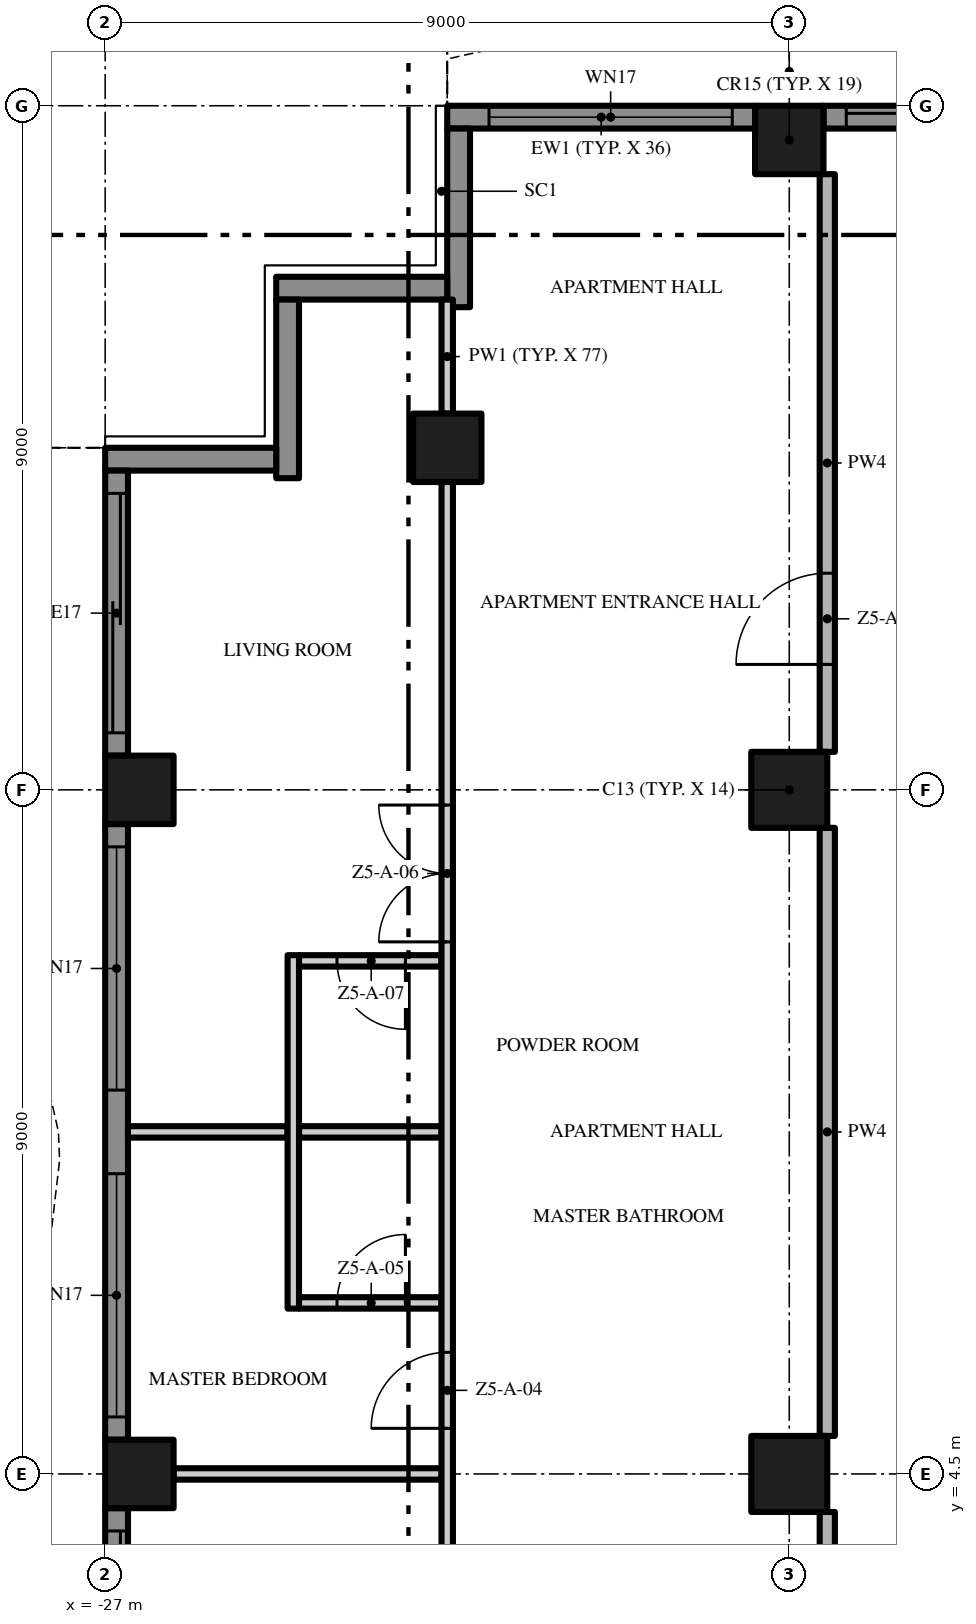
"""IFC4 building model, lengths in metres.
Left out: names, types, materials, properties, quantities, classifications, styles, units other than length and angle.
Written with IfcOpenShell. Run it as: python <this file> out.ifc"""

import sys

from ifc_helpers import new_model, si_unit, direction, frame, frame_2d, origin, origin_2d, place, context, subcontext, project, spatial, polyline, rectangle, outline, extrude, element, fill, save


model = new_model("IFC4")
c1 = context("Model", 3, precision=1e-05, world=origin(), true_north=direction((0.0, 1.0)))
c2 = subcontext(c1, "Body", "Model", "MODEL_VIEW")
j1 = project(units=[si_unit("LENGTHUNIT", "METRE"), si_unit("PLANEANGLEUNIT", "RADIAN")], contexts=[c1])
p1 = place(None, origin())
s1 = spatial("IfcSite", under=j1, at=p1, CompositionType="ELEMENT")
p2 = place(p1, origin())
s2 = spatial("IfcBuilding", under=s1, at=p2, CompositionType="ELEMENT")
p3 = place(p2, frame((0.0, 0.0, 246.4)))
s3 = spatial("IfcBuildingStorey", under=s2, at=p3, CompositionType="ELEMENT", Elevation=246.4)
p4 = place(p3, frame((-18.0, 13.5, 0.0), z_axis=(0.0, 0.0, 1.0), x_axis=(1.0, 0.0, 0.0)))
e1 = element("IfcColumn", 1, at=p4, inside=s3, PredefinedType="COLUMN", context=c2, shape_type="SweptSolid", body=[
    extrude(rectangle(XDim=1.0, YDim=1.0, at=origin_2d()), origin(), (0.0, 0.0, 1.0), 3.5),
])
p5 = place(p3, frame((-18.0, 22.05, 0.0), z_axis=(0.0, 0.0, 1.0), x_axis=(1.0, 0.0, 0.0)))
e2 = element("IfcColumn", 2, at=p5, inside=s3, PredefinedType="COLUMN", context=c2, shape_type="SweptSolid", body=[
    extrude(rectangle(XDim=0.9, YDim=0.9, at=origin_2d()), origin(), (0.0, 0.0, 1.0), 3.5),
])
p6 = place(p3, frame((-18.0, 4.5, 0.0), z_axis=(0.0, 0.0, 1.0), x_axis=(1.0, 0.0, 0.0)))
e3 = element("IfcColumn", 3, at=p6, inside=s3, PredefinedType="COLUMN", context=c2, shape_type="SweptSolid", body=[
    extrude(rectangle(XDim=1.0, YDim=1.0, at=origin_2d()), origin(), (0.0, 0.0, 1.0), 3.5),
])
for number, where, z_axis, x_axis in (
    (4, (-26.55, 13.5, 0.0), (0.0, 0.0, 1.0), (1.0, 0.0, 0.0)),
    (5, (-22.5, 18.0, 0.0), (0.0, 0.0, 1.0), (1.0, 0.0, 0.0)),
    (6, (-26.55, 4.5, 0.0), (0.0, 0.0, 1.0), (1.0, 0.0, 0.0)),
):
    element("IfcColumn", number, at=place(p3, frame(where, z_axis=z_axis, x_axis=x_axis)), inside=s3, PredefinedType="COLUMN", context=c2, shape_type="SweptSolid", body=[
        extrude(rectangle(XDim=0.9, YDim=0.9, at=origin_2d()), origin(), (0.0, 0.0, 1.0), 3.5),
    ])
p7 = place(p3, frame((-17.55, 22.35, 0.0), z_axis=(0.0, 0.0, 1.0), x_axis=(1.0, 0.0, 0.0)))
e7 = element("IfcWall", 7, at=p7, inside=s3, PredefinedType="SOLIDWALL", context=c2, shape_type="SweptSolid", body=[
    extrude(rectangle(XDim=4.05, YDim=0.3, at=frame_2d((2.025, 0.0))), origin(), (0.0, 0.0, 1.0), 3.5),
])
p8 = place(p7, frame((0.3, 0.0, 0.0)))
e8 = element("IfcOpeningElement", 8, at=p8, cuts=e7, PredefinedType="OPENING", context=c2, shape_type="SweptSolid", body=[
    extrude(rectangle(XDim=3.2, YDim=2.4, at=frame_2d((1.6, 1.2))), frame((0.0, 0.16, 0.0), z_axis=(0.0, -1.0, 0.0), x_axis=(1.0, 0.0, 0.0)), (0.0, 0.0, 1.0), 0.32),
])
p9 = place(p3, frame((-22.5, 22.35, 0.0), z_axis=(0.0, 0.0, 1.0), x_axis=(1.0, 0.0, 0.0)))
e9 = element("IfcWall", 9, at=p9, inside=s3, PredefinedType="SOLIDWALL", context=c2, shape_type="SweptSolid", body=[
    extrude(rectangle(XDim=4.05, YDim=0.3, at=frame_2d((2.025, 0.0))), origin(), (0.0, 0.0, 1.0), 3.5),
])
p10 = place(p9, frame((0.55, 0.0, 0.45)))
e10 = element("IfcOpeningElement", 10, at=p10, cuts=e9, PredefinedType="OPENING", context=c2, shape_type="SweptSolid", body=[
    extrude(rectangle(XDim=3.2, YDim=2.65, at=frame_2d((1.6, 1.325))), frame((0.0, 0.16, 0.0), z_axis=(0.0, -1.0, 0.0), x_axis=(1.0, 0.0, 0.0)), (0.0, 0.0, 1.0), 0.32),
])
p11 = place(p3, frame((-22.35, 19.85, 0.0), z_axis=(0.0, 0.0, 1.0), x_axis=(0.0, 1.0, 0.0)))
e11 = element("IfcWall", 11, at=p11, inside=s3, PredefinedType="SOLIDWALL", context=c2, shape_type="SweptSolid", body=[
    extrude(rectangle(XDim=2.35, YDim=0.3, at=frame_2d((1.175, 0.0))), origin(), (0.0, 0.0, 1.0), 3.5),
])
p12 = place(p3, frame((-24.75, 20.1, 0.0), z_axis=(0.0, 0.0, 1.0), x_axis=(1.0, 0.0, 0.0)))
e12 = element("IfcWall", 12, at=p12, inside=s3, PredefinedType="SOLIDWALL", context=c2, shape_type="SweptSolid", body=[
    extrude(rectangle(XDim=2.25, YDim=0.3, at=frame_2d((1.125, 0.0))), origin(), (0.0, 0.0, 1.0), 3.5),
])
p13 = place(p3, frame((-24.6, 17.6, 0.0), z_axis=(0.0, 0.0, 1.0), x_axis=(0.0, 1.0, 0.0)))
e13 = element("IfcWall", 13, at=p13, inside=s3, PredefinedType="SOLIDWALL", context=c2, shape_type="SweptSolid", body=[
    extrude(rectangle(XDim=2.35, YDim=0.3, at=frame_2d((1.175, 0.0))), origin(), (0.0, 0.0, 1.0), 3.5),
])
p14 = place(p3, frame((-27.0, 17.85, 0.0), z_axis=(0.0, 0.0, 1.0), x_axis=(1.0, 0.0, 0.0)))
e14 = element("IfcWall", 14, at=p14, inside=s3, PredefinedType="SOLIDWALL", context=c2, shape_type="SweptSolid", body=[
    extrude(rectangle(XDim=2.25, YDim=0.3, at=frame_2d((1.125, 0.0))), origin(), (0.0, 0.0, 1.0), 3.5),
])
p15 = place(p3, frame((-26.85, 13.95, 0.0), z_axis=(0.0, 0.0, 1.0), x_axis=(0.0, 1.0, 0.0)))
e15 = element("IfcWall", 15, at=p15, inside=s3, PredefinedType="SOLIDWALL", context=c2, shape_type="SweptSolid", body=[
    extrude(rectangle(XDim=3.75, YDim=0.3, at=frame_2d((1.875, 0.0))), origin(), (0.0, 0.0, 1.0), 3.5),
])
p16 = place(p15, frame((0.3, 0.0, 0.0)))
e16 = element("IfcOpeningElement", 16, at=p16, cuts=e15, PredefinedType="OPENING", context=c2, shape_type="SweptSolid", body=[
    extrude(rectangle(XDim=3.15, YDim=2.4, at=frame_2d((1.575, 1.2))), frame((0.0, 0.16, 0.0), z_axis=(0.0, -1.0, 0.0), x_axis=(1.0, 0.0, 0.0)), (0.0, 0.0, 1.0), 0.32),
])
p17 = place(p3, frame((-26.85, 4.95, 0.0), z_axis=(0.0, 0.0, 1.0), x_axis=(0.0, 1.0, 0.0)))
e17 = element("IfcWall", 17, at=p17, inside=s3, PredefinedType="SOLIDWALL", context=c2, shape_type="SweptSolid", body=[
    extrude(rectangle(XDim=8.1, YDim=0.3, at=frame_2d((4.05, 0.0))), origin(), (0.0, 0.0, 1.0), 3.5),
])
p18 = place(p17, frame((4.6, 0.0, 0.45)))
e18 = element("IfcOpeningElement", 18, at=p18, cuts=e17, PredefinedType="OPENING", context=c2, shape_type="SweptSolid", body=[
    extrude(rectangle(XDim=3.2, YDim=2.65, at=frame_2d((1.6, 1.325))), frame((0.0, 0.16, 0.0), z_axis=(0.0, -1.0, 0.0), x_axis=(1.0, 0.0, 0.0)), (0.0, 0.0, 1.0), 0.32),
])
p19 = place(p17, frame((0.3, 0.0, 0.45)))
e19 = element("IfcOpeningElement", 19, at=p19, cuts=e17, PredefinedType="OPENING", context=c2, shape_type="SweptSolid", body=[
    extrude(rectangle(XDim=3.2, YDim=2.65, at=frame_2d((1.6, 1.325))), frame((0.0, 0.16, 0.0), z_axis=(0.0, -1.0, 0.0), x_axis=(1.0, 0.0, 0.0)), (0.0, 0.0, 1.0), 0.32),
])
p20 = place(p3, frame((-26.85, -4.05, 0.0), z_axis=(0.0, 0.0, 1.0), x_axis=(0.0, 1.0, 0.0)))
e20 = element("IfcWall", 20, at=p20, inside=s3, PredefinedType="SOLIDWALL", context=c2, shape_type="SweptSolid", body=[
    extrude(rectangle(XDim=8.1, YDim=0.3, at=frame_2d((4.05, 0.0))), origin(), (0.0, 0.0, 1.0), 3.5),
])
p21 = place(p20, frame((4.6, 0.0, 0.0)))
e21 = element("IfcOpeningElement", 21, at=p21, cuts=e20, PredefinedType="OPENING", context=c2, shape_type="SweptSolid", body=[
    extrude(rectangle(XDim=3.2, YDim=2.4, at=frame_2d((1.6, 1.2))), frame((0.0, 0.16, 0.0), z_axis=(0.0, -1.0, 0.0), x_axis=(1.0, 0.0, 0.0)), (0.0, 0.0, 1.0), 0.32),
])
p22 = place(p20, frame((0.3, 0.0, 0.45)))
e22 = element("IfcOpeningElement", 22, at=p22, cuts=e20, PredefinedType="OPENING", context=c2, shape_type="SweptSolid", body=[
    extrude(rectangle(XDim=3.2, YDim=2.65, at=frame_2d((1.6, 1.325))), frame((0.0, 0.16, 0.0), z_axis=(0.0, -1.0, 0.0), x_axis=(1.0, 0.0, 0.0)), (0.0, 0.0, 1.0), 0.32),
])
p23 = place(p3, origin())
e23 = element("IfcWall", 23, at=p23, inside=s3, PredefinedType="USERDEFINED", context=c2, shape_type="SweptSolid", body=[
    extrude(outline(polyline([(-13.5, 25.149), (-15.0, 25.485), (-15.375, 25.5), (-16.5, 25.369), (-18.0, 24.845), (-19.5, 24.112), (-21.0, 23.451), (-22.5, 23.115), (-22.445, 22.871), (-20.921, 23.213), (-19.395, 23.885), (-17.904, 24.614), (-16.444, 25.124), (-15.365, 25.249), (-15.033, 25.236), (-13.555, 24.905), (-13.5, 25.149)])), origin(), (0.0, 0.0, 1.0), 0.9),
])
p24 = place(p3, origin())
e24 = element("IfcWall", 24, at=p24, inside=s3, PredefinedType="USERDEFINED", context=c2, shape_type="SweptSolid", body=[
    extrude(outline(polyline([(-29.649, 18.0), (-29.985, 16.5), (-30.0, 16.125), (-29.869, 15.0), (-29.345, 13.5), (-28.612, 12.0), (-27.951, 10.5), (-27.615, 9.0), (-27.6, 8.625), (-27.731, 7.5), (-28.255, 6.0), (-28.988, 4.5), (-29.649, 3.0), (-29.985, 1.5), (-30.0, 1.125), (-29.869, 0.0), (-29.345, -1.5), (-28.612, -3.0), (-27.951, -4.5), (-27.615, -6.0), (-27.6, -6.375), (-27.731, -7.5), (-28.255, -9.0), (-28.988, -10.5), (-29.649, -12.0), (-29.985, -13.5), (-30.0, -13.875), (-29.869, -15.0), (-29.345, -16.5), (-28.612, -18.0), (-28.388, -17.89), (-29.114, -16.404), (-29.624, -14.944), (-29.749, -13.865), (-29.736, -13.533), (-29.41, -12.079), (-28.761, -10.605), (-28.024, -9.096), (-27.486, -7.556), (-27.349, -6.385), (-27.366, -5.967), (-27.713, -4.421), (-28.385, -2.895), (-29.114, -1.404), (-29.624, 0.056), (-29.749, 1.135), (-29.736, 1.467), (-29.41, 2.921), (-28.761, 4.395), (-28.024, 5.904), (-27.486, 7.444), (-27.349, 8.615), (-27.366, 9.033), (-27.713, 10.579), (-28.385, 12.105), (-29.114, 13.596), (-29.624, 15.056), (-29.749, 16.135), (-29.736, 16.467), (-29.405, 17.945), (-29.649, 18.0)])), origin(), (0.0, 0.0, 1.0), 0.9),
])
p25 = place(p3, frame((-26.1, 4.5, 0.0), z_axis=(0.0, 0.0, 1.0), x_axis=(1.0, 0.0, 0.0)))
e25 = element("IfcWall", 25, at=p25, inside=s3, PredefinedType="PARTITIONING", context=c2, shape_type="SweptSolid", body=[
    extrude(rectangle(XDim=3.525, YDim=0.15, at=frame_2d((1.762, 0.0))), origin(), (0.0, 0.0, 1.0), 3.5),
])
p26 = place(p3, frame((-24.45, 6.75, 0.0), z_axis=(0.0, 0.0, 1.0), x_axis=(1.0, 0.0, 0.0)))
e26 = element("IfcWall", 26, at=p26, inside=s3, PredefinedType="PARTITIONING", context=c2, shape_type="SweptSolid", body=[
    extrude(rectangle(XDim=1.875, YDim=0.15, at=frame_2d((0.938, 0.0))), origin(), (0.0, 0.0, 1.0), 3.5),
])
p27 = place(p26, frame((0.5, 0.0, 0.0)))
e27 = element("IfcOpeningElement", 27, at=p27, cuts=e26, PredefinedType="OPENING", context=c2, shape_type="SweptSolid", body=[
    extrude(rectangle(XDim=0.9, YDim=2.1, at=frame_2d((0.45, 1.05))), frame((0.0, 0.085, 0.0), z_axis=(0.0, -1.0, 0.0), x_axis=(1.0, 0.0, 0.0)), (0.0, 0.0, 1.0), 0.17),
])
p28 = place(p3, frame((-26.7, 9.0, 0.0), z_axis=(0.0, 0.0, 1.0), x_axis=(1.0, 0.0, 0.0)))
e28 = element("IfcWall", 28, at=p28, inside=s3, PredefinedType="PARTITIONING", context=c2, shape_type="SweptSolid", body=[
    extrude(rectangle(XDim=2.1, YDim=0.15, at=frame_2d((1.05, 0.0))), origin(), (0.0, 0.0, 1.0), 3.5),
])
p29 = place(p3, frame((-24.45, 9.0, 0.0), z_axis=(0.0, 0.0, 1.0), x_axis=(1.0, 0.0, 0.0)))
e29 = element("IfcWall", 29, at=p29, inside=s3, PredefinedType="PARTITIONING", context=c2, shape_type="SweptSolid", body=[
    extrude(rectangle(XDim=1.875, YDim=0.15, at=frame_2d((0.938, 0.0))), origin(), (0.0, 0.0, 1.0), 3.5),
])
p30 = place(p3, frame((-22.575, 11.25, 0.0), z_axis=(0.0, 0.0, 1.0), x_axis=(-1.0, 0.0, 0.0)))
e30 = element("IfcWall", 30, at=p30, inside=s3, PredefinedType="PARTITIONING", context=c2, shape_type="SweptSolid", body=[
    extrude(rectangle(XDim=1.875, YDim=0.15, at=frame_2d((0.938, 0.0))), origin(), (0.0, 0.0, 1.0), 3.5),
])
p31 = place(p30, frame((0.475, 0.0, 0.0)))
e31 = element("IfcOpeningElement", 31, at=p31, cuts=e30, PredefinedType="OPENING", context=c2, shape_type="SweptSolid", body=[
    extrude(rectangle(XDim=0.9, YDim=2.1, at=frame_2d((0.45, 1.05))), frame((0.0, 0.085, 0.0), z_axis=(0.0, -1.0, 0.0), x_axis=(1.0, 0.0, 0.0)), (0.0, 0.0, 1.0), 0.17),
])
p32 = place(p3, frame((-24.525, 6.675, 0.0), z_axis=(0.0, 0.0, 1.0), x_axis=(0.0, 1.0, 0.0)))
e32 = element("IfcWall", 32, at=p32, inside=s3, PredefinedType="PARTITIONING", context=c2, shape_type="SweptSolid", body=[
    extrude(rectangle(XDim=4.65, YDim=0.15, at=frame_2d((2.325, 0.0))), origin(), (0.0, 0.0, 1.0), 3.5),
])
p33 = place(p3, frame((-22.5, 0.1, 0.0), z_axis=(0.0, 0.0, 1.0), x_axis=(0.0, 1.0, 0.0)))
e33 = element("IfcWall", 33, at=p33, inside=s3, PredefinedType="PARTITIONING", context=c2, shape_type="SweptSolid", body=[
    extrude(rectangle(XDim=17.45, YDim=0.15, at=frame_2d((8.725, 0.0))), origin(), (0.0, 0.0, 1.0), 3.5),
])
p34 = place(p33, frame((1.65, 0.0, 0.0)))
e34 = element("IfcOpeningElement", 34, at=p34, cuts=e33, PredefinedType="OPENING", context=c2, shape_type="SweptSolid", body=[
    extrude(rectangle(XDim=1.0, YDim=2.4, at=frame_2d((0.5, 1.2))), frame((0.0, 0.085, 0.0), z_axis=(0.0, -1.0, 0.0), x_axis=(1.0, 0.0, 0.0)), (0.0, 0.0, 1.0), 0.17),
])
p35 = place(p33, frame((5.0, 0.0, 0.0)))
e35 = element("IfcOpeningElement", 35, at=p35, cuts=e33, PredefinedType="OPENING", context=c2, shape_type="SweptSolid", body=[
    extrude(rectangle(XDim=1.0, YDim=2.4, at=frame_2d((0.5, 1.2))), frame((0.0, 0.085, 0.0), z_axis=(0.0, -1.0, 0.0), x_axis=(1.0, 0.0, 0.0)), (0.0, 0.0, 1.0), 0.17),
])
p36 = place(p33, frame((11.4, 0.0, 0.0)))
e36 = element("IfcOpeningElement", 36, at=p36, cuts=e33, PredefinedType="OPENING", context=c2, shape_type="SweptSolid", body=[
    extrude(rectangle(XDim=1.8, YDim=2.4, at=frame_2d((0.9, 1.2))), frame((0.0, 0.085, 0.0), z_axis=(0.0, -1.0, 0.0), x_axis=(1.0, 0.0, 0.0)), (0.0, 0.0, 1.0), 0.17),
])
p37 = place(p3, frame((-22.5, 18.45, 0.0), z_axis=(0.0, 0.0, 1.0), x_axis=(0.0, 1.0, 0.0)))
e37 = element("IfcWall", 37, at=p37, inside=s3, PredefinedType="PARTITIONING", context=c2, shape_type="SweptSolid", body=[
    extrude(rectangle(XDim=1.5, YDim=0.15, at=frame_2d((0.75, 0.0))), origin(), (0.0, 0.0, 1.0), 3.5),
])
p38 = place(p3, frame((-17.5, -0.2, 0.0), z_axis=(0.0, 0.0, 1.0), x_axis=(0.0, 1.0, 0.0)))
e38 = element("IfcWall", 38, at=p38, inside=s3, PredefinedType="PARTITIONING", context=c2, shape_type="SweptSolid", body=[
    extrude(rectangle(XDim=4.2, YDim=0.2, at=frame_2d((2.1, 0.0))), origin(), (0.0, 0.0, 1.0), 3.5),
])
p39 = place(p3, frame((-17.5, 5.0, 0.0), z_axis=(0.0, 0.0, 1.0), x_axis=(0.0, 1.0, 0.0)))
e39 = element("IfcWall", 39, at=p39, inside=s3, PredefinedType="PARTITIONING", context=c2, shape_type="SweptSolid", body=[
    extrude(rectangle(XDim=8.0, YDim=0.2, at=frame_2d((4.0, 0.0))), origin(), (0.0, 0.0, 1.0), 3.5),
])
p40 = place(p3, frame((-17.5, 14.0, 0.0), z_axis=(0.0, 0.0, 1.0), x_axis=(0.0, 1.0, 0.0)))
e40 = element("IfcWall", 40, at=p40, inside=s3, PredefinedType="PARTITIONING", context=c2, shape_type="SweptSolid", body=[
    extrude(rectangle(XDim=7.6, YDim=0.2, at=frame_2d((3.8, 0.0))), origin(), (0.0, 0.0, 1.0), 3.5),
])
p41 = place(p40, frame((1.15, 0.0, 0.0)))
e41 = element("IfcOpeningElement", 41, at=p41, cuts=e40, PredefinedType="OPENING", context=c2, shape_type="SweptSolid", body=[
    extrude(rectangle(XDim=1.2, YDim=2.4, at=frame_2d((0.6, 1.2))), frame((0.0, 0.11, 0.0), z_axis=(0.0, -1.0, 0.0), x_axis=(1.0, 0.0, 0.0)), (0.0, 0.0, 1.0), 0.22),
])
p42 = place(p8, origin())
e42 = element("IfcDoor", 42, at=p42, inside=s3, OperationType="SINGLE_SWING_LEFT", PredefinedType="DOOR", context=c2, shape_type="SweptSolid", body=[
    extrude(rectangle(XDim=3.2, YDim=2.4, at=frame_2d((1.6, 1.2))), frame((0.0, 0.025, 0.0), z_axis=(0.0, -1.0, 0.0), x_axis=(1.0, 0.0, 0.0)), (0.0, 0.0, 1.0), 0.05),
])
fill(e8, e42)
p43 = place(p10, origin())
e43 = element("IfcWindow", 43, at=p43, inside=s3, PartitioningType="SINGLE_PANEL", PredefinedType="WINDOW", context=c2, shape_type="SweptSolid", body=[
    extrude(rectangle(XDim=3.2, YDim=2.65, at=frame_2d((1.6, 1.325))), frame((0.0, 0.03, 0.0), z_axis=(0.0, -1.0, 0.0), x_axis=(1.0, 0.0, 0.0)), (0.0, 0.0, 1.0), 0.06),
])
fill(e10, e43)
p44 = place(p16, origin())
e44 = element("IfcDoor", 44, at=p44, inside=s3, OperationType="SINGLE_SWING_LEFT", PredefinedType="DOOR", context=c2, shape_type="SweptSolid", body=[
    extrude(rectangle(XDim=3.15, YDim=2.4, at=frame_2d((1.575, 1.2))), frame((0.0, 0.025, 0.0), z_axis=(0.0, -1.0, 0.0), x_axis=(1.0, 0.0, 0.0)), (0.0, 0.0, 1.0), 0.05),
])
fill(e16, e44)
p45 = place(p18, origin())
e45 = element("IfcWindow", 45, at=p45, inside=s3, PartitioningType="SINGLE_PANEL", PredefinedType="WINDOW", context=c2, shape_type="SweptSolid", body=[
    extrude(rectangle(XDim=3.2, YDim=2.65, at=frame_2d((1.6, 1.325))), frame((0.0, 0.03, 0.0), z_axis=(0.0, -1.0, 0.0), x_axis=(1.0, 0.0, 0.0)), (0.0, 0.0, 1.0), 0.06),
])
fill(e18, e45)
p46 = place(p19, origin())
e46 = element("IfcWindow", 46, at=p46, inside=s3, PartitioningType="SINGLE_PANEL", PredefinedType="WINDOW", context=c2, shape_type="SweptSolid", body=[
    extrude(rectangle(XDim=3.2, YDim=2.65, at=frame_2d((1.6, 1.325))), frame((0.0, 0.03, 0.0), z_axis=(0.0, -1.0, 0.0), x_axis=(1.0, 0.0, 0.0)), (0.0, 0.0, 1.0), 0.06),
])
fill(e19, e46)
p47 = place(p21, origin())
e47 = element("IfcDoor", 47, at=p47, inside=s3, OperationType="SINGLE_SWING_LEFT", PredefinedType="DOOR", context=c2, shape_type="SweptSolid", body=[
    extrude(rectangle(XDim=3.2, YDim=2.4, at=frame_2d((1.6, 1.2))), frame((0.0, 0.025, 0.0), z_axis=(0.0, -1.0, 0.0), x_axis=(1.0, 0.0, 0.0)), (0.0, 0.0, 1.0), 0.05),
])
fill(e21, e47)
p48 = place(p41, origin())
e48 = element("IfcDoor", 48, at=p48, inside=s3, OperationType="SINGLE_SWING_LEFT", PredefinedType="DOOR", context=c2, shape_type="SweptSolid", body=[
    extrude(rectangle(XDim=1.2, YDim=2.4, at=frame_2d((0.6, 1.2))), frame((0.0, 0.025, 0.0), z_axis=(0.0, -1.0, 0.0), x_axis=(1.0, 0.0, 0.0)), (0.0, 0.0, 1.0), 0.05),
])
fill(e41, e48)
p49 = place(p35, origin())
e49 = element("IfcDoor", 49, at=p49, inside=s3, OperationType="SINGLE_SWING_LEFT", PredefinedType="DOOR", context=c2, shape_type="SweptSolid", body=[
    extrude(rectangle(XDim=1.0, YDim=2.4, at=frame_2d((0.5, 1.2))), frame((0.0, 0.025, 0.0), z_axis=(0.0, -1.0, 0.0), x_axis=(1.0, 0.0, 0.0)), (0.0, 0.0, 1.0), 0.05),
])
fill(e35, e49)
p50 = place(p27, origin())
e50 = element("IfcDoor", 50, at=p50, inside=s3, OperationType="SINGLE_SWING_RIGHT", PredefinedType="DOOR", context=c2, shape_type="SweptSolid", body=[
    extrude(rectangle(XDim=0.9, YDim=2.1, at=frame_2d((0.45, 1.05))), frame((0.0, 0.025, 0.0), z_axis=(0.0, -1.0, 0.0), x_axis=(1.0, 0.0, 0.0)), (0.0, 0.0, 1.0), 0.05),
])
fill(e27, e50)
p51 = place(p36, origin())
e51 = element("IfcDoor", 51, at=p51, inside=s3, OperationType="DOUBLE_DOOR_SINGLE_SWING", PredefinedType="DOOR", context=c2, shape_type="SweptSolid", body=[
    extrude(rectangle(XDim=1.8, YDim=2.4, at=frame_2d((0.9, 1.2))), frame((0.0, 0.025, 0.0), z_axis=(0.0, -1.0, 0.0), x_axis=(1.0, 0.0, 0.0)), (0.0, 0.0, 1.0), 0.05),
])
fill(e36, e51)
p52 = place(p31, origin())
e52 = element("IfcDoor", 52, at=p52, inside=s3, OperationType="SINGLE_SWING_LEFT", PredefinedType="DOOR", context=c2, shape_type="SweptSolid", body=[
    extrude(rectangle(XDim=0.9, YDim=2.1, at=frame_2d((0.45, 1.05))), frame((0.0, 0.025, 0.0), z_axis=(0.0, -1.0, 0.0), x_axis=(1.0, 0.0, 0.0)), (0.0, 0.0, 1.0), 0.05),
])
fill(e31, e52)
save(model, sys.argv[1])
